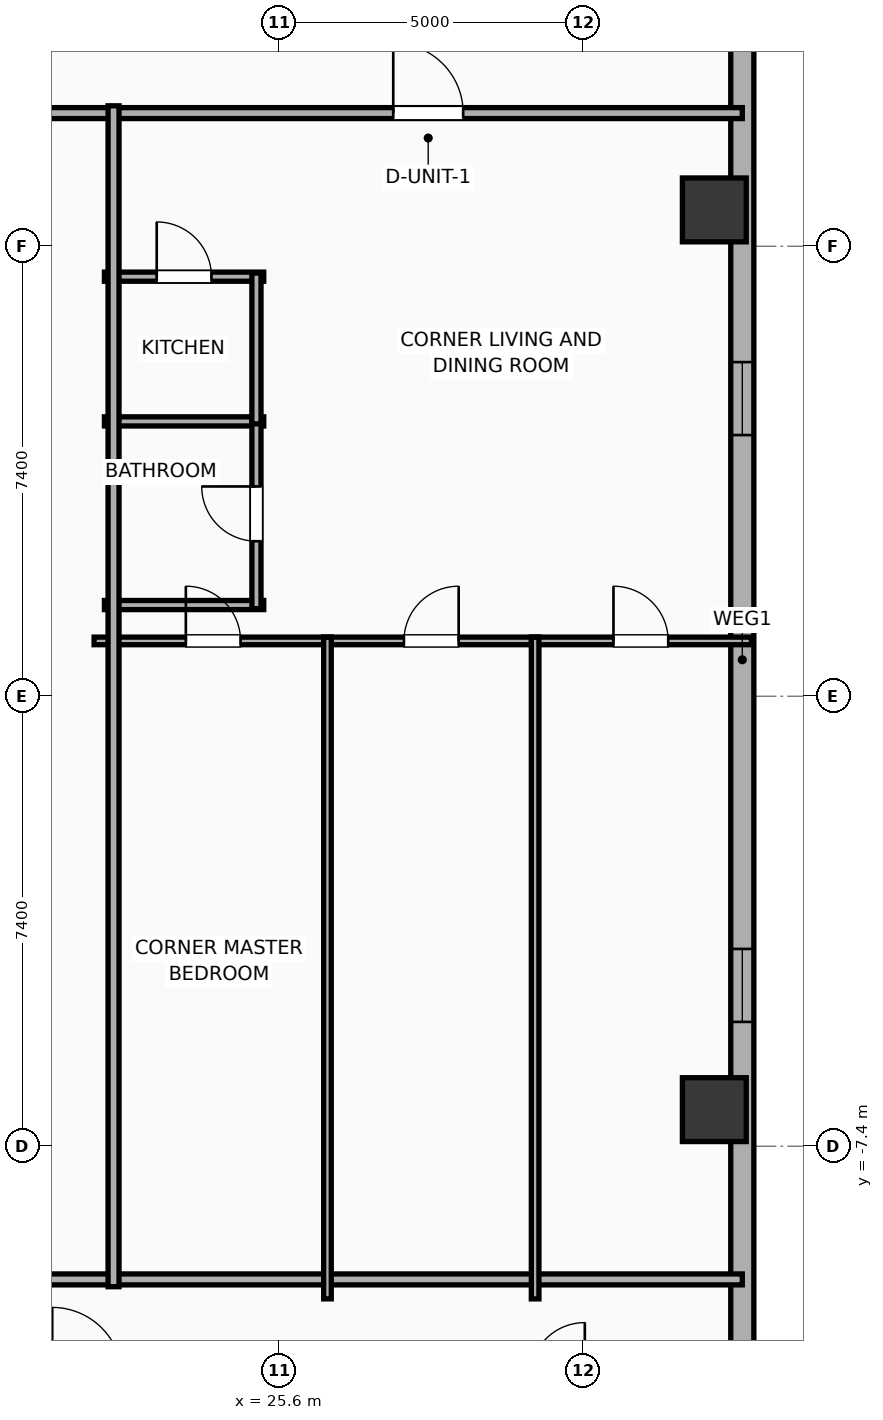
"""IFC4 building model, lengths in metres.
Left out: names, types, materials, properties, quantities, classifications, styles, units other than length and angle.
Written with IfcOpenShell. Run it as: python <this file> out.ifc"""

import sys

from ifc_helpers import new_model, si_unit, direction, frame, frame_2d, origin, origin_2d, place, context, subcontext, project, spatial, rectangle, hollow_rectangle, extrude, element, fill, save


model = new_model("IFC4")
c1 = context("Model", 3, precision=1e-05, world=origin(), true_north=direction((0.0, 1.0)))
c2 = subcontext(c1, "Body", "Model", "MODEL_VIEW")
j1 = project(units=[si_unit("LENGTHUNIT", "METRE"), si_unit("PLANEANGLEUNIT", "RADIAN")], contexts=[c1])
p1 = place(None, origin())
s1 = spatial("IfcSite", under=j1, at=p1, CompositionType="ELEMENT")
p2 = place(p1, origin())
s2 = spatial("IfcBuilding", under=s1, at=p2, CompositionType="ELEMENT")
p3 = place(p2, frame((0.0, 0.0, 120.9)))
s3 = spatial("IfcBuildingStorey", under=s2, at=p3, CompositionType="ELEMENT", Elevation=120.9)
for number, where, z_axis, x_axis in (
    (1, (32.75, -6.798, 0.0), (0.0, 0.0, 1.0), (1.0, 0.0, 0.0)),
    (2, (32.75, 7.998, 0.0), (0.0, 0.0, 1.0), (1.0, 0.0, 0.0)),
):
    element("IfcColumn", number, at=place(p3, frame(where, z_axis=z_axis, x_axis=x_axis)), inside=s3, PredefinedType="COLUMN", context=c2, shape_type="SweptSolid", body=[
        extrude(hollow_rectangle(XDim=1.05, YDim=1.05, WallThickness=0.036, at=origin_2d()), origin(), (0.0, 0.0, 1.0), 3.9),
    ])
p4 = place(p3, frame((33.21, 17.781, 0.0), z_axis=(0.0, 0.0, 1.0), x_axis=(0.0, -1.0, 0.0)))
e3 = element("IfcWall", 3, at=p4, inside=s3, PredefinedType="ELEMENTEDWALL", context=c2, shape_type="SweptSolid", body=[
    extrude(rectangle(XDim=34.363, YDim=0.38, at=frame_2d((17.181, 0.0))), origin(), (0.0, 0.0, 1.0), 3.65),
])
p5 = place(p4, frame((12.286, 0.0, 0.75)))
e4 = element("IfcOpeningElement", 4, at=p5, cuts=e3, PredefinedType="OPENING", context=c2, shape_type="SweptSolid", body=[
    extrude(rectangle(XDim=1.2, YDim=2.05, at=frame_2d((0.6, 1.025))), frame((0.0, 0.2, 0.0), z_axis=(0.0, -1.0, 0.0), x_axis=(1.0, 0.0, 0.0)), (0.0, 0.0, 1.0), 0.4),
])
p6 = place(p4, frame((21.936, 0.0, 0.75)))
e5 = element("IfcOpeningElement", 5, at=p6, cuts=e3, PredefinedType="OPENING", context=c2, shape_type="SweptSolid", body=[
    extrude(rectangle(XDim=1.2, YDim=2.05, at=frame_2d((0.6, 1.025))), frame((0.0, 0.2, 0.0), z_axis=(0.0, -1.0, 0.0), x_axis=(1.0, 0.0, 0.0)), (0.0, 0.0, 1.0), 0.4),
])
p7 = place(p3, frame((9.88, 9.59, 0.0), z_axis=(0.0, 0.0, 1.0), x_axis=(1.0, 0.0, 0.0)))
e6 = element("IfcWall", 6, at=p7, inside=s3, PredefinedType="PARTITIONING", context=c2, shape_type="SweptSolid", body=[
    extrude(rectangle(XDim=23.33, YDim=0.18, at=frame_2d((11.665, 0.0))), origin(), (0.0, 0.0, 1.0), 3.65),
])
p8 = place(p7, frame((17.59, 0.0, 0.0)))
e7 = element("IfcOpeningElement", 7, at=p8, cuts=e6, PredefinedType="OPENING", context=c2, shape_type="SweptSolid", body=[
    extrude(rectangle(XDim=1.15, YDim=2.05, at=frame_2d((0.575, 1.025))), frame((0.0, 0.1, 0.0), z_axis=(0.0, -1.0, 0.0), x_axis=(1.0, 0.0, 0.0)), (0.0, 0.0, 1.0), 0.2),
])
p9 = place(p3, frame((9.88, -9.59, 0.0), z_axis=(0.0, 0.0, 1.0), x_axis=(1.0, 0.0, 0.0)))
e8 = element("IfcWall", 8, at=p9, inside=s3, PredefinedType="PARTITIONING", context=c2, shape_type="SweptSolid", body=[
    extrude(rectangle(XDim=23.33, YDim=0.18, at=frame_2d((11.665, 0.0))), origin(), (0.0, 0.0, 1.0), 3.65),
])
p10 = place(p3, frame((22.72, 6.9, 0.0), z_axis=(0.0, 0.0, 1.0), x_axis=(1.0, 0.0, 0.0)))
e9 = element("IfcWall", 9, at=p10, inside=s3, PredefinedType="PLUMBINGWALL", context=c2, shape_type="SweptSolid", body=[
    extrude(rectangle(XDim=2.62, YDim=0.15, at=frame_2d((1.31, 0.0))), origin(), (0.0, 0.0, 1.0), 3.65),
])
p11 = place(p10, frame((0.86, 0.0, 0.0)))
e10 = element("IfcOpeningElement", 10, at=p11, cuts=e9, PredefinedType="OPENING", context=c2, shape_type="SweptSolid", body=[
    extrude(rectangle(XDim=0.9, YDim=2.05, at=frame_2d((0.45, 1.025))), frame((0.0, 0.085, 0.0), z_axis=(0.0, -1.0, 0.0), x_axis=(1.0, 0.0, 0.0)), (0.0, 0.0, 1.0), 0.17),
])
for number, where, z_axis, x_axis in (
    (11, (22.72, 4.52, 0.0), (0.0, 0.0, 1.0), (1.0, 0.0, 0.0)),
    (12, (22.72, 1.5, 0.0), (0.0, 0.0, 1.0), (1.0, 0.0, 0.0)),
):
    element("IfcWall", number, at=place(p3, frame(where, z_axis=z_axis, x_axis=x_axis)), inside=s3, PredefinedType="PLUMBINGWALL", context=c2, shape_type="SweptSolid", body=[
        extrude(rectangle(XDim=2.62, YDim=0.15, at=frame_2d((1.31, 0.0))), origin(), (0.0, 0.0, 1.0), 3.65),
    ])
p12 = place(p3, frame((25.22, 1.44, 0.0), z_axis=(0.0, 0.0, 1.0), x_axis=(0.0, 1.0, 0.0)))
e13 = element("IfcWall", 13, at=p12, inside=s3, PredefinedType="PLUMBINGWALL", context=c2, shape_type="SweptSolid", body=[
    extrude(rectangle(XDim=3.12, YDim=0.15, at=frame_2d((1.56, 0.0))), origin(), (0.0, 0.0, 1.0), 3.65),
])
p13 = place(p12, frame((1.11, 0.0, 0.0)))
e14 = element("IfcOpeningElement", 14, at=p13, cuts=e13, PredefinedType="OPENING", context=c2, shape_type="SweptSolid", body=[
    extrude(rectangle(XDim=0.9, YDim=2.05, at=frame_2d((0.45, 1.025))), frame((0.0, 0.085, 0.0), z_axis=(0.0, -1.0, 0.0), x_axis=(1.0, 0.0, 0.0)), (0.0, 0.0, 1.0), 0.17),
])
p14 = place(p3, frame((25.22, 4.48, 0.0), z_axis=(0.0, 0.0, 1.0), x_axis=(0.0, 1.0, 0.0)))
e15 = element("IfcWall", 15, at=p14, inside=s3, PredefinedType="PLUMBINGWALL", context=c2, shape_type="SweptSolid", body=[
    extrude(rectangle(XDim=2.48, YDim=0.15, at=frame_2d((1.24, 0.0))), origin(), (0.0, 0.0, 1.0), 3.65),
])
p15 = place(p3, frame((22.55, 0.91, 0.0), z_axis=(0.0, 0.0, 1.0), x_axis=(1.0, 0.0, 0.0)))
e16 = element("IfcWall", 16, at=p15, inside=s3, PredefinedType="PARTITIONING", context=c2, shape_type="SweptSolid", body=[
    extrude(rectangle(XDim=3.9, YDim=0.125, at=frame_2d((1.95, 0.0))), origin(), (0.0, 0.0, 1.0), 3.65),
])
p16 = place(p15, frame((1.509, 0.0, 0.0)))
e17 = element("IfcOpeningElement", 17, at=p16, cuts=e16, PredefinedType="OPENING", context=c2, shape_type="SweptSolid", body=[
    extrude(rectangle(XDim=0.9, YDim=2.05, at=frame_2d((0.45, 1.025))), frame((0.0, 0.073, 0.0), z_axis=(0.0, -1.0, 0.0), x_axis=(1.0, 0.0, 0.0)), (0.0, 0.0, 1.0), 0.145),
])
p17 = place(p3, frame((26.325, 0.91, 0.0), z_axis=(0.0, 0.0, 1.0), x_axis=(1.0, 0.0, 0.0)))
e18 = element("IfcWall", 18, at=p17, inside=s3, PredefinedType="PARTITIONING", context=c2, shape_type="SweptSolid", body=[
    extrude(rectangle(XDim=3.54, YDim=0.125, at=frame_2d((1.77, 0.0))), origin(), (0.0, 0.0, 1.0), 3.65),
])
p18 = place(p17, frame((1.32, 0.0, 0.0)))
e19 = element("IfcOpeningElement", 19, at=p18, cuts=e18, PredefinedType="OPENING", context=c2, shape_type="SweptSolid", body=[
    extrude(rectangle(XDim=0.9, YDim=2.05, at=frame_2d((0.45, 1.025))), frame((0.0, 0.073, 0.0), z_axis=(0.0, -1.0, 0.0), x_axis=(1.0, 0.0, 0.0)), (0.0, 0.0, 1.0), 0.145),
])
p19 = place(p3, frame((29.74, 0.91, 0.0), z_axis=(0.0, 0.0, 1.0), x_axis=(1.0, 0.0, 0.0)))
e20 = element("IfcWall", 20, at=p19, inside=s3, PredefinedType="PARTITIONING", context=c2, shape_type="SweptSolid", body=[
    extrude(rectangle(XDim=3.62, YDim=0.125, at=frame_2d((1.81, 0.0))), origin(), (0.0, 0.0, 1.0), 3.65),
])
p20 = place(p19, frame((1.351, 0.0, 0.0)))
e21 = element("IfcOpeningElement", 21, at=p20, cuts=e20, PredefinedType="OPENING", context=c2, shape_type="SweptSolid", body=[
    extrude(rectangle(XDim=0.9, YDim=2.05, at=frame_2d((0.45, 1.025))), frame((0.0, 0.073, 0.0), z_axis=(0.0, -1.0, 0.0), x_axis=(1.0, 0.0, 0.0)), (0.0, 0.0, 1.0), 0.145),
])
for number, where, z_axis, x_axis in (
    (22, (29.803, -9.91, 0.0), (0.0, 0.0, 1.0), (0.0, 1.0, 0.0)),
    (23, (26.388, -9.91, 0.0), (0.0, 0.0, 1.0), (0.0, 1.0, 0.0)),
):
    element("IfcWall", number, at=place(p3, frame(where, z_axis=z_axis, x_axis=x_axis)), inside=s3, PredefinedType="PARTITIONING", context=c2, shape_type="SweptSolid", body=[
        extrude(rectangle(XDim=10.88, YDim=0.125, at=frame_2d((5.44, 0.0))), origin(), (0.0, 0.0, 1.0), 3.65),
    ])
p21 = place(p3, frame((22.87, -9.71, 0.0), z_axis=(0.0, 0.0, 1.0), x_axis=(0.0, 1.0, 0.0)))
e24 = element("IfcWall", 24, at=p21, inside=s3, PredefinedType="PARTITIONING", context=c2, shape_type="SweptSolid", body=[
    extrude(rectangle(XDim=19.42, YDim=0.18, at=frame_2d((9.71, 0.0))), origin(), (0.0, 0.0, 1.0), 3.65),
])
p22 = place(p5, origin())
e25 = element("IfcWindow", 25, at=p22, inside=s3, PartitioningType="SINGLE_PANEL", PredefinedType="WINDOW", context=c2, shape_type="SweptSolid", body=[
    extrude(rectangle(XDim=1.2, YDim=2.05, at=frame_2d((0.6, 1.025))), frame((0.0, 0.03, 0.0), z_axis=(0.0, -1.0, 0.0), x_axis=(1.0, 0.0, 0.0)), (0.0, 0.0, 1.0), 0.06),
])
fill(e4, e25)
p23 = place(p6, origin())
e26 = element("IfcWindow", 26, at=p23, inside=s3, PartitioningType="SINGLE_PANEL", PredefinedType="WINDOW", context=c2, shape_type="SweptSolid", body=[
    extrude(rectangle(XDim=1.2, YDim=2.05, at=frame_2d((0.6, 1.025))), frame((0.0, 0.03, 0.0), z_axis=(0.0, -1.0, 0.0), x_axis=(1.0, 0.0, 0.0)), (0.0, 0.0, 1.0), 0.06),
])
fill(e5, e26)
p24 = place(p8, origin())
e27 = element("IfcDoor", 27, at=p24, inside=s3, OperationType="SINGLE_SWING_LEFT", PredefinedType="DOOR", context=c2, shape_type="SweptSolid", body=[
    extrude(rectangle(XDim=1.15, YDim=2.05, at=frame_2d((0.575, 1.025))), frame((0.0, 0.025, 0.0), z_axis=(0.0, -1.0, 0.0), x_axis=(1.0, 0.0, 0.0)), (0.0, 0.0, 1.0), 0.05),
])
fill(e7, e27)
p25 = place(p11, origin())
e28 = element("IfcDoor", 28, at=p25, inside=s3, OperationType="SINGLE_SWING_LEFT", PredefinedType="DOOR", context=c2, shape_type="SweptSolid", body=[
    extrude(rectangle(XDim=0.9, YDim=2.05, at=frame_2d((0.45, 1.025))), frame((0.0, 0.025, 0.0), z_axis=(0.0, -1.0, 0.0), x_axis=(1.0, 0.0, 0.0)), (0.0, 0.0, 1.0), 0.05),
])
fill(e10, e28)
p26 = place(p13, origin())
e29 = element("IfcDoor", 29, at=p26, inside=s3, OperationType="SINGLE_SWING_RIGHT", PredefinedType="DOOR", context=c2, shape_type="SweptSolid", body=[
    extrude(rectangle(XDim=0.9, YDim=2.05, at=frame_2d((0.45, 1.025))), frame((0.0, 0.025, 0.0), z_axis=(0.0, -1.0, 0.0), x_axis=(1.0, 0.0, 0.0)), (0.0, 0.0, 1.0), 0.05),
])
fill(e14, e29)
p27 = place(p16, origin())
e30 = element("IfcDoor", 30, at=p27, inside=s3, OperationType="SINGLE_SWING_LEFT", PredefinedType="DOOR", context=c2, shape_type="SweptSolid", body=[
    extrude(rectangle(XDim=0.9, YDim=2.05, at=frame_2d((0.45, 1.025))), frame((0.0, 0.025, 0.0), z_axis=(0.0, -1.0, 0.0), x_axis=(1.0, 0.0, 0.0)), (0.0, 0.0, 1.0), 0.05),
])
fill(e17, e30)
p28 = place(p18, origin())
e31 = element("IfcDoor", 31, at=p28, inside=s3, OperationType="SINGLE_SWING_RIGHT", PredefinedType="DOOR", context=c2, shape_type="SweptSolid", body=[
    extrude(rectangle(XDim=0.9, YDim=2.05, at=frame_2d((0.45, 1.025))), frame((0.0, 0.025, 0.0), z_axis=(0.0, -1.0, 0.0), x_axis=(1.0, 0.0, 0.0)), (0.0, 0.0, 1.0), 0.05),
])
fill(e19, e31)
p29 = place(p20, origin())
e32 = element("IfcDoor", 32, at=p29, inside=s3, OperationType="SINGLE_SWING_LEFT", PredefinedType="DOOR", context=c2, shape_type="SweptSolid", body=[
    extrude(rectangle(XDim=0.9, YDim=2.05, at=frame_2d((0.45, 1.025))), frame((0.0, 0.025, 0.0), z_axis=(0.0, -1.0, 0.0), x_axis=(1.0, 0.0, 0.0)), (0.0, 0.0, 1.0), 0.05),
])
fill(e21, e32)
save(model, sys.argv[1])
